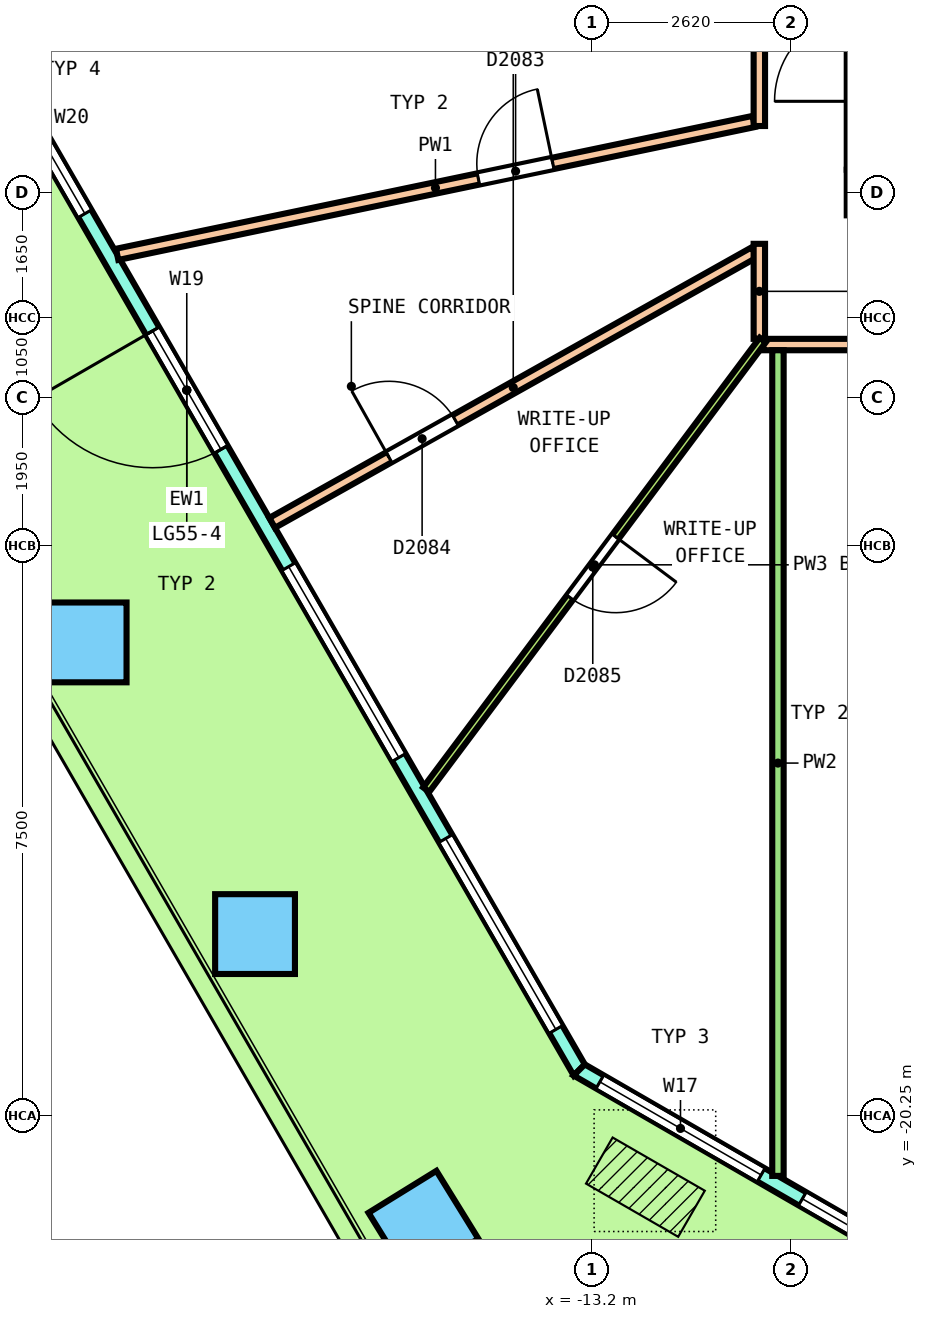
"""IFC4 building model, lengths in metres.
Left out: names, types, materials, properties, quantities, classifications, styles, units other than length and angle.
Written with IfcOpenShell. Run it as: python <this file> out.ifc"""

import sys

from ifc_helpers import new_model, si_unit, direction, frame, frame_2d, origin, origin_2d, place, context, subcontext, project, spatial, polyline, rectangle, outline, extrude, element, fill, save


model = new_model("IFC4")
c1 = context("Model", 3, precision=1e-05, world=origin(), true_north=direction((0.0, 1.0)))
c2 = subcontext(c1, "Body", "Model", "MODEL_VIEW")
j1 = project(units=[si_unit("LENGTHUNIT", "METRE"), si_unit("PLANEANGLEUNIT", "RADIAN")], contexts=[c1])
p1 = place(None, origin())
s1 = spatial("IfcSite", under=j1, at=p1, CompositionType="ELEMENT")
p2 = place(p1, origin())
s2 = spatial("IfcBuilding", under=s1, at=p2, CompositionType="ELEMENT")
p3 = place(p2, frame((0.0, 0.0, 253.4)))
s3 = spatial("IfcBuildingStorey", under=s2, at=p3, CompositionType="ELEMENT", Elevation=253.4)
p4 = place(p3, frame((-19.85, -14.019, 0.0), z_axis=(-0.037985280426, 0.065738610314, 0.997113611172), x_axis=(0.49877068165, -0.863402201049, 0.075923951094)))
e1 = element("IfcColumn", 1, at=p4, inside=s3, PredefinedType="COLUMN", context=c2, shape_type="SweptSolid", body=[
    extrude(rectangle(XDim=1.05, YDim=1.05, at=origin_2d()), origin(), (0.0, 0.0, 1.0), 3.651),
])
p5 = place(p3, frame((-17.635, -17.856, 0.0), z_axis=(-0.111476147864, 0.193007383282, 0.974844202145), x_axis=(0.48748245992, -0.844204992977, 0.222887373134)))
e2 = element("IfcColumn", 2, at=p5, inside=s3, PredefinedType="COLUMN", context=c2, shape_type="SweptSolid", body=[
    extrude(rectangle(XDim=1.05, YDim=1.05, at=origin_2d()), origin(), (0.0, 0.0, 1.0), 3.734),
])
for number, where, z_axis, x_axis in (
    (3, (-15.419, -21.693, 0.0), (-0.178, 0.308, 0.934), (0.853, -0.426, 0.303)),
    (4, (-12.105, -23.606, 0.0), (-0.178, 0.308, 0.934), (0.853, -0.426, 0.303)),
):
    element("IfcColumn", number, at=place(p3, frame(where, z_axis=z_axis, x_axis=x_axis)), inside=s3, PredefinedType="COLUMN", context=c2, shape_type="SweptSolid", body=[
        extrude(rectangle(XDim=1.05, YDim=1.05, at=origin_2d()), origin(), (0.0, 0.0, 1.0), 3.895),
    ])
p6 = place(p3, frame((-23.696, -1.757, 0.0), z_axis=(0.0, 0.0, 1.0), x_axis=(0.500000087574, -0.866025353224, 0.0)))
e5 = element("IfcWall", 5, at=p6, inside=s3, PredefinedType="SOLIDWALL", context=c2, shape_type="SweptSolid", body=[
    extrude(outline(polyline([(-0.027, -0.1), (1.009, -0.1), (2.044, -0.1), (3.079, -0.1), (4.115, -0.1), (5.15, -0.1), (6.185, -0.1), (7.221, -0.1), (8.256, -0.1), (9.292, -0.1), (10.327, -0.1), (11.362, -0.1), (12.398, -0.1), (13.433, -0.1), (14.469, -0.1), (15.504, -0.1), (16.539, -0.1), (17.574, -0.1), (18.61, -0.1), (19.645, -0.1), (20.681, -0.1), (20.627, 0.1), (19.597, 0.1), (18.567, 0.1), (17.537, 0.1), (16.507, 0.1), (15.477, 0.1), (14.447, 0.1), (13.417, 0.1), (12.387, 0.1), (11.357, 0.1), (10.327, 0.1), (9.297, 0.1), (8.267, 0.1), (7.237, 0.1), (6.207, 0.1), (5.177, 0.1), (4.147, 0.1), (3.117, 0.1), (2.087, 0.1), (1.057, 0.1), (0.027, 0.1), (-0.027, -0.1)])), origin(), (0.0, 0.0, 1.0), 3.7),
])
p7 = place(p6, frame((0.615, 0.0, 0.1)))
e6 = element("IfcOpeningElement", 6, at=p7, cuts=e5, PredefinedType="OPENING", context=c2, shape_type="SweptSolid", body=[
    extrude(rectangle(XDim=2.9, YDim=2.65, at=frame_2d((1.45, 1.325))), frame((0.0, 0.11, 0.0), z_axis=(0.0, -1.0, 0.0), x_axis=(1.0, 0.0, 0.0)), (0.0, 0.0, 1.0), 0.22),
])
p8 = place(p6, frame((4.746, 0.0, 0.1)))
e7 = element("IfcOpeningElement", 7, at=p8, cuts=e5, PredefinedType="OPENING", context=c2, shape_type="SweptSolid", body=[
    extrude(rectangle(XDim=2.9, YDim=2.65, at=frame_2d((1.45, 1.325))), frame((0.0, 0.11, 0.0), z_axis=(0.0, -1.0, 0.0), x_axis=(1.0, 0.0, 0.0)), (0.0, 0.0, 1.0), 0.22),
])
p9 = place(p6, frame((9.427, 0.0, 0.0)))
e8 = element("IfcOpeningElement", 8, at=p9, cuts=e5, PredefinedType="OPENING", context=c2, shape_type="SweptSolid", body=[
    extrude(rectangle(XDim=1.8, YDim=2.4, at=frame_2d((0.9, 1.2))), frame((0.0, 0.11, 0.0), z_axis=(0.0, -1.0, 0.0), x_axis=(1.0, 0.0, 0.0)), (0.0, 0.0, 1.0), 0.22),
])
p10 = place(p6, frame((9.427, 0.0, 2.55)))
e9 = element("IfcOpeningElement", 9, at=p10, cuts=e5, PredefinedType="OPENING", context=c2, shape_type="SweptSolid", body=[
    extrude(rectangle(XDim=1.8, YDim=0.2, at=frame_2d((0.9, 0.1))), frame((0.0, 0.11, 0.0), z_axis=(0.0, -1.0, 0.0), x_axis=(1.0, 0.0, 0.0)), (0.0, 0.0, 1.0), 0.22),
])
p11 = place(p6, frame((13.008, 0.0, 0.1)))
e10 = element("IfcOpeningElement", 10, at=p11, cuts=e5, PredefinedType="OPENING", context=c2, shape_type="SweptSolid", body=[
    extrude(rectangle(XDim=2.9, YDim=2.65, at=frame_2d((1.45, 1.325))), frame((0.0, 0.11, 0.0), z_axis=(0.0, -1.0, 0.0), x_axis=(1.0, 0.0, 0.0)), (0.0, 0.0, 1.0), 0.22),
])
p12 = place(p6, frame((17.139, 0.0, 0.1)))
e11 = element("IfcOpeningElement", 11, at=p12, cuts=e5, PredefinedType="OPENING", context=c2, shape_type="SweptSolid", body=[
    extrude(rectangle(XDim=2.9, YDim=2.65, at=frame_2d((1.45, 1.325))), frame((0.0, 0.11, 0.0), z_axis=(0.0, -1.0, 0.0), x_axis=(1.0, 0.0, 0.0)), (0.0, 0.0, 1.0), 0.22),
])
p13 = place(p3, frame((-13.369, -19.643, 0.0), z_axis=(0.0, 0.0, 1.0), x_axis=(0.866002544807, -0.50003959082, 0.0)))
e12 = element("IfcWall", 12, at=p13, inside=s3, PredefinedType="SOLIDWALL", context=c2, shape_type="SweptSolid", body=[
    extrude(outline(polyline([(-0.027, -0.1), (1.008, -0.1), (2.042, -0.1), (3.076, -0.1), (4.111, -0.1), (5.145, -0.1), (6.18, -0.1), (6.126, 0.1), (5.109, 0.1), (4.093, 0.1), (3.076, 0.1), (2.06, 0.1), (1.043, 0.1), (0.027, 0.1), (-0.027, -0.1)])), origin(), (0.0, 0.0, 1.0), 3.7),
])
p14 = place(p13, frame((0.313, 0.0, 0.1)))
e13 = element("IfcOpeningElement", 13, at=p14, cuts=e12, PredefinedType="OPENING", context=c2, shape_type="SweptSolid", body=[
    extrude(rectangle(XDim=2.45, YDim=2.65, at=frame_2d((1.225, 1.325))), frame((0.0, 0.11, 0.0), z_axis=(0.0, -1.0, 0.0), x_axis=(1.0, 0.0, 0.0)), (0.0, 0.0, 1.0), 0.22),
])
p15 = place(p13, frame((3.39, 0.0, 0.1)))
e14 = element("IfcOpeningElement", 14, at=p15, cuts=e12, PredefinedType="OPENING", context=c2, shape_type="SweptSolid", body=[
    extrude(rectangle(XDim=2.45, YDim=2.65, at=frame_2d((1.225, 1.325))), frame((0.0, 0.11, 0.0), z_axis=(0.0, -1.0, 0.0), x_axis=(1.0, 0.0, 0.0)), (0.0, 0.0, 1.0), 0.22),
])
p16 = place(p3, frame((-9.85, -8.1, 0.0), z_axis=(0.0, 0.0, 1.0), x_axis=(1.0, 0.0, 0.0)))
e15 = element("IfcWall", 15, at=p16, inside=s3, PredefinedType="SHEAR", context=c2, shape_type="SweptSolid", body=[
    extrude(rectangle(XDim=19.7, YDim=0.6, at=frame_2d((9.85, 0.0))), origin(), (0.0, 0.0, 1.0), 3.7),
])
p17 = place(p16, frame((11.4, 0.0, 0.0)))
e16 = element("IfcOpeningElement", 16, at=p17, cuts=e15, PredefinedType="OPENING", context=c2, shape_type="SweptSolid", body=[
    extrude(rectangle(XDim=1.2, YDim=2.1, at=frame_2d((0.6, 1.05))), frame((0.0, 0.31, 0.0), z_axis=(0.0, -1.0, 0.0), x_axis=(1.0, 0.0, 0.0)), (0.0, 0.0, 1.0), 0.62),
])
p18 = place(p3, frame((-9.6, -7.8, 0.0), z_axis=(0.0, 0.0, 1.0), x_axis=(0.0, 1.0, 0.0)))
e17 = element("IfcWall", 17, at=p18, inside=s3, PredefinedType="SHEAR", context=c2, shape_type="SweptSolid", body=[
    extrude(rectangle(XDim=15.6, YDim=0.5, at=frame_2d((7.8, 0.0))), origin(), (0.0, 0.0, 1.0), 3.7),
])
p19 = place(p18, frame((6.6, 0.0, 0.0)))
e18 = element("IfcOpeningElement", 18, at=p19, cuts=e17, PredefinedType="OPENING", context=c2, shape_type="SweptSolid", body=[
    extrude(rectangle(XDim=2.4, YDim=2.1, at=frame_2d((1.2, 1.05))), frame((0.0, 0.26, 0.0), z_axis=(0.0, -1.0, 0.0), x_axis=(1.0, 0.0, 0.0)), (0.0, 0.0, 1.0), 0.52),
])
p20 = place(p18, frame((13.5, 0.0, 0.0)))
e19 = element("IfcOpeningElement", 19, at=p20, cuts=e17, PredefinedType="OPENING", context=c2, shape_type="SweptSolid", body=[
    extrude(rectangle(XDim=1.2, YDim=2.1, at=frame_2d((0.6, 1.05))), frame((0.0, 0.26, 0.0), z_axis=(0.0, -1.0, 0.0), x_axis=(1.0, 0.0, 0.0)), (0.0, 0.0, 1.0), 0.52),
])
p21 = place(p18, frame((0.9, 0.0, 0.0)))
e20 = element("IfcOpeningElement", 20, at=p21, cuts=e17, PredefinedType="OPENING", context=c2, shape_type="SweptSolid", body=[
    extrude(rectangle(XDim=1.2, YDim=2.1, at=frame_2d((0.6, 1.05))), frame((0.0, 0.26, 0.0), z_axis=(0.0, -1.0, 0.0), x_axis=(1.0, 0.0, 0.0)), (0.0, 0.0, 1.0), 0.52),
])
p22 = place(p3, frame((-19.449, -8.914, 0.0), z_axis=(0.0, 0.0, 1.0), x_axis=(0.978899865728, 0.204340531657, 0.0)))
e21 = element("IfcWall", 21, at=p22, inside=s3, PredefinedType="PARTITIONING", context=c2, shape_type="SweptSolid", body=[
    extrude(rectangle(XDim=8.556, YDim=0.15, at=frame_2d((4.278, 0.0))), origin(), (0.0, 0.0, 1.0), 2.8),
])
p23 = place(p22, frame((4.855, 0.0, 0.0)))
e22 = element("IfcOpeningElement", 22, at=p23, cuts=e21, PredefinedType="OPENING", context=c2, shape_type="SweptSolid", body=[
    extrude(rectangle(XDim=1.0, YDim=2.1, at=frame_2d((0.5, 1.05))), frame((0.0, 0.085, 0.0), z_axis=(0.0, -1.0, 0.0), x_axis=(1.0, 0.0, 0.0)), (0.0, 0.0, 1.0), 0.17),
])
p24 = place(p3, frame((-17.41, -12.446, 0.0), z_axis=(0.0, 0.0, 1.0), x_axis=(0.872150376128, 0.489237898592, 0.0)))
e23 = element("IfcWall", 23, at=p24, inside=s3, PredefinedType="PARTITIONING", context=c2, shape_type="SweptSolid", body=[
    extrude(rectangle(XDim=7.274, YDim=0.15, at=frame_2d((3.637, 0.0))), origin(), (0.0, 0.0, 1.0), 3.65),
])
p25 = place(p24, frame((1.762, 0.0, 0.0)))
e24 = element("IfcOpeningElement", 24, at=p25, cuts=e23, PredefinedType="OPENING", context=c2, shape_type="SweptSolid", body=[
    extrude(rectangle(XDim=1.0, YDim=2.1, at=frame_2d((0.5, 1.05))), frame((0.0, 0.085, 0.0), z_axis=(0.0, -1.0, 0.0), x_axis=(1.0, 0.0, 0.0)), (0.0, 0.0, 1.0), 0.17),
])
p26 = place(p3, frame((-11.0, -10.025, 0.0), z_axis=(0.0, 0.0, 1.0), x_axis=(0.0, 1.0, 0.0)))
e25 = element("IfcWall", 25, at=p26, inside=s3, PredefinedType="PARTITIONING", context=c2, shape_type="SweptSolid", body=[
    extrude(rectangle(XDim=1.25, YDim=0.15, at=frame_2d((0.625, 0.0))), origin(), (0.0, 0.0, 1.0), 3.65),
])
p27 = place(p3, frame((-11.0, -7.225, 0.0), z_axis=(0.0, 0.0, 1.0), x_axis=(0.0, 1.0, 0.0)))
e26 = element("IfcWall", 26, at=p27, inside=s3, PredefinedType="PARTITIONING", context=c2, shape_type="SweptSolid", body=[
    extrude(rectangle(XDim=17.275, YDim=0.15, at=frame_2d((8.638, 0.0))), origin(), (0.0, 0.0, 1.0), 2.8),
])
p28 = place(p27, frame((15.679, 0.0, 0.0)))
e27 = element("IfcOpeningElement", 27, at=p28, cuts=e26, PredefinedType="OPENING", context=c2, shape_type="SweptSolid", body=[
    extrude(rectangle(XDim=1.0, YDim=2.1, at=frame_2d((0.5, 1.05))), frame((0.0, 0.085, 0.0), z_axis=(0.0, -1.0, 0.0), x_axis=(1.0, 0.0, 0.0)), (0.0, 0.0, 1.0), 0.17),
])
p29 = place(p27, frame((12.381, 0.0, 0.0)))
e28 = element("IfcOpeningElement", 28, at=p29, cuts=e26, PredefinedType="OPENING", context=c2, shape_type="SweptSolid", body=[
    extrude(rectangle(XDim=1.0, YDim=2.1, at=frame_2d((0.5, 1.05))), frame((0.0, 0.085, 0.0), z_axis=(0.0, -1.0, 0.0), x_axis=(1.0, 0.0, 0.0)), (0.0, 0.0, 1.0), 0.17),
])
p30 = place(p27, frame((9.947, 0.0, 0.0)))
e29 = element("IfcOpeningElement", 29, at=p30, cuts=e26, PredefinedType="OPENING", context=c2, shape_type="SweptSolid", body=[
    extrude(rectangle(XDim=1.0, YDim=2.1, at=frame_2d((0.5, 1.05))), frame((0.0, 0.085, 0.0), z_axis=(0.0, -1.0, 0.0), x_axis=(1.0, 0.0, 0.0)), (0.0, 0.0, 1.0), 0.17),
])
p31 = place(p27, frame((6.283, 0.0, 0.0)))
e30 = element("IfcOpeningElement", 30, at=p31, cuts=e26, PredefinedType="OPENING", context=c2, shape_type="SweptSolid", body=[
    extrude(rectangle(XDim=1.0, YDim=2.1, at=frame_2d((0.5, 1.05))), frame((0.0, 0.085, 0.0), z_axis=(0.0, -1.0, 0.0), x_axis=(1.0, 0.0, 0.0)), (0.0, 0.0, 1.0), 0.17),
])
p32 = place(p3, frame((-10.95, -10.1, 0.0), z_axis=(0.0, 0.0, 1.0), x_axis=(1.0, 0.0, 0.0)))
e31 = element("IfcWall", 31, at=p32, inside=s3, PredefinedType="PARTITIONING", context=c2, shape_type="SweptSolid", body=[
    extrude(rectangle(XDim=21.875, YDim=0.15, at=frame_2d((10.938, 0.0))), origin(), (0.0, 0.0, 1.0), 2.8),
])
p33 = place(p32, frame((3.079, 0.0, 0.0)))
e32 = element("IfcOpeningElement", 32, at=p33, cuts=e31, PredefinedType="OPENING", context=c2, shape_type="SweptSolid", body=[
    extrude(rectangle(XDim=1.2, YDim=2.1, at=frame_2d((0.6, 1.05))), frame((0.0, 0.085, 0.0), z_axis=(0.0, -1.0, 0.0), x_axis=(1.0, 0.0, 0.0)), (0.0, 0.0, 1.0), 0.17),
])
p34 = place(p32, frame((14.744, 0.0, 0.0)))
e33 = element("IfcOpeningElement", 33, at=p34, cuts=e31, PredefinedType="OPENING", context=c2, shape_type="SweptSolid", body=[
    extrude(rectangle(XDim=1.2, YDim=2.1, at=frame_2d((0.6, 1.05))), frame((0.0, 0.085, 0.0), z_axis=(0.0, -1.0, 0.0), x_axis=(1.0, 0.0, 0.0)), (0.0, 0.0, 1.0), 0.17),
])
p35 = place(p32, frame((20.169, 0.0, 0.0)))
e34 = element("IfcOpeningElement", 34, at=p35, cuts=e31, PredefinedType="OPENING", context=c2, shape_type="SweptSolid", body=[
    extrude(rectangle(XDim=1.0, YDim=2.1, at=frame_2d((0.5, 1.05))), frame((0.0, 0.085, 0.0), z_axis=(0.0, -1.0, 0.0), x_axis=(1.0, 0.0, 0.0)), (0.0, 0.0, 1.0), 0.17),
])
p36 = place(p3, frame((-10.755, -21.037, 0.0), z_axis=(0.0, 0.0, 1.0), x_axis=(0.0, 1.0, 0.0)))
e35 = element("IfcWall", 35, at=p36, inside=s3, PredefinedType="PARTITIONING", context=c2, shape_type="SweptSolid", body=[
    extrude(rectangle(XDim=10.862, YDim=0.15, at=frame_2d((5.431, 0.0))), origin(), (0.0, 0.0, 1.0), 2.8),
])
p37 = place(p3, frame((-15.383, -15.956, 0.0), z_axis=(0.0, 0.0, 1.0), x_axis=(0.599233213561, 0.800574516061, 0.0)))
e36 = element("IfcWall", 36, at=p37, inside=s3, PredefinedType="PARTITIONING", context=c2, shape_type="SweptSolid", body=[
    extrude(rectangle(XDim=7.389, YDim=0.1, at=frame_2d((3.695, 0.0))), origin(), (0.0, 0.0, 1.0), 2.8),
])
p38 = place(p37, frame((3.157, 0.0, 0.0)))
e37 = element("IfcOpeningElement", 37, at=p38, cuts=e36, PredefinedType="OPENING", context=c2, shape_type="SweptSolid", body=[
    extrude(rectangle(XDim=1.0, YDim=2.1, at=frame_2d((0.5, 1.05))), frame((0.0, 0.06, 0.0), z_axis=(0.0, -1.0, 0.0), x_axis=(1.0, 0.0, 0.0)), (0.0, 0.0, 1.0), 0.12),
])
p39 = place(p8, origin())
e38 = element("IfcWindow", 38, at=p39, inside=s3, PartitioningType="SINGLE_PANEL", PredefinedType="WINDOW", context=c2, shape_type="SweptSolid", body=[
    extrude(rectangle(XDim=2.9, YDim=2.65, at=frame_2d((1.45, 1.325))), frame((0.0, 0.03, 0.0), z_axis=(0.0, -1.0, 0.0), x_axis=(1.0, 0.0, 0.0)), (0.0, 0.0, 1.0), 0.06),
])
fill(e7, e38)
p40 = place(p9, origin())
e39 = element("IfcDoor", 39, at=p40, inside=s3, OperationType="DOUBLE_DOOR_SINGLE_SWING", PredefinedType="DOOR", context=c2, shape_type="SweptSolid", body=[
    extrude(rectangle(XDim=1.8, YDim=2.4, at=frame_2d((0.9, 1.2))), frame((0.0, 0.025, 0.0), z_axis=(0.0, -1.0, 0.0), x_axis=(1.0, 0.0, 0.0)), (0.0, 0.0, 1.0), 0.05),
])
fill(e8, e39)
p41 = place(p10, origin())
e40 = element("IfcWindow", 40, at=p41, inside=s3, PartitioningType="SINGLE_PANEL", PredefinedType="WINDOW", context=c2, shape_type="SweptSolid", body=[
    extrude(rectangle(XDim=1.8, YDim=0.2, at=frame_2d((0.9, 0.1))), frame((0.0, 0.03, 0.0), z_axis=(0.0, -1.0, 0.0), x_axis=(1.0, 0.0, 0.0)), (0.0, 0.0, 1.0), 0.06),
])
fill(e9, e40)
p42 = place(p11, origin())
e41 = element("IfcWindow", 41, at=p42, inside=s3, PartitioningType="SINGLE_PANEL", PredefinedType="WINDOW", context=c2, shape_type="SweptSolid", body=[
    extrude(rectangle(XDim=2.9, YDim=2.65, at=frame_2d((1.45, 1.325))), frame((0.0, 0.03, 0.0), z_axis=(0.0, -1.0, 0.0), x_axis=(1.0, 0.0, 0.0)), (0.0, 0.0, 1.0), 0.06),
])
fill(e10, e41)
p43 = place(p12, origin())
e42 = element("IfcWindow", 42, at=p43, inside=s3, PartitioningType="SINGLE_PANEL", PredefinedType="WINDOW", context=c2, shape_type="SweptSolid", body=[
    extrude(rectangle(XDim=2.9, YDim=2.65, at=frame_2d((1.45, 1.325))), frame((0.0, 0.03, 0.0), z_axis=(0.0, -1.0, 0.0), x_axis=(1.0, 0.0, 0.0)), (0.0, 0.0, 1.0), 0.06),
])
fill(e11, e42)
p44 = place(p14, origin())
e43 = element("IfcWindow", 43, at=p44, inside=s3, PartitioningType="SINGLE_PANEL", PredefinedType="WINDOW", context=c2, shape_type="SweptSolid", body=[
    extrude(rectangle(XDim=2.45, YDim=2.65, at=frame_2d((1.225, 1.325))), frame((0.0, 0.03, 0.0), z_axis=(0.0, -1.0, 0.0), x_axis=(1.0, 0.0, 0.0)), (0.0, 0.0, 1.0), 0.06),
])
fill(e13, e43)
p45 = place(p15, origin())
e44 = element("IfcWindow", 44, at=p45, inside=s3, PartitioningType="SINGLE_PANEL", PredefinedType="WINDOW", context=c2, shape_type="SweptSolid", body=[
    extrude(rectangle(XDim=2.45, YDim=2.65, at=frame_2d((1.225, 1.325))), frame((0.0, 0.03, 0.0), z_axis=(0.0, -1.0, 0.0), x_axis=(1.0, 0.0, 0.0)), (0.0, 0.0, 1.0), 0.06),
])
fill(e14, e44)
p46 = place(p23, origin())
e45 = element("IfcDoor", 45, at=p46, inside=s3, OperationType="SINGLE_SWING_RIGHT", PredefinedType="DOOR", context=c2, shape_type="SweptSolid", body=[
    extrude(rectangle(XDim=1.0, YDim=2.1, at=frame_2d((0.5, 1.05))), frame((0.0, 0.025, 0.0), z_axis=(0.0, -1.0, 0.0), x_axis=(1.0, 0.0, 0.0)), (0.0, 0.0, 1.0), 0.05),
])
fill(e22, e45)
p47 = place(p25, origin())
e46 = element("IfcDoor", 46, at=p47, inside=s3, OperationType="SINGLE_SWING_LEFT", PredefinedType="DOOR", context=c2, shape_type="SweptSolid", body=[
    extrude(rectangle(XDim=1.0, YDim=2.1, at=frame_2d((0.5, 1.05))), frame((0.0, 0.025, 0.0), z_axis=(0.0, -1.0, 0.0), x_axis=(1.0, 0.0, 0.0)), (0.0, 0.0, 1.0), 0.05),
])
fill(e24, e46)
p48 = place(p38, origin())
e47 = element("IfcDoor", 47, at=p48, inside=s3, OperationType="SINGLE_SWING_RIGHT", PredefinedType="DOOR", context=c2, shape_type="SweptSolid", body=[
    extrude(rectangle(XDim=1.0, YDim=2.1, at=frame_2d((0.5, 1.05))), frame((0.0, 0.025, 0.0), z_axis=(0.0, -1.0, 0.0), x_axis=(1.0, 0.0, 0.0)), (0.0, 0.0, 1.0), 0.05),
])
fill(e37, e47)
save(model, sys.argv[1])
